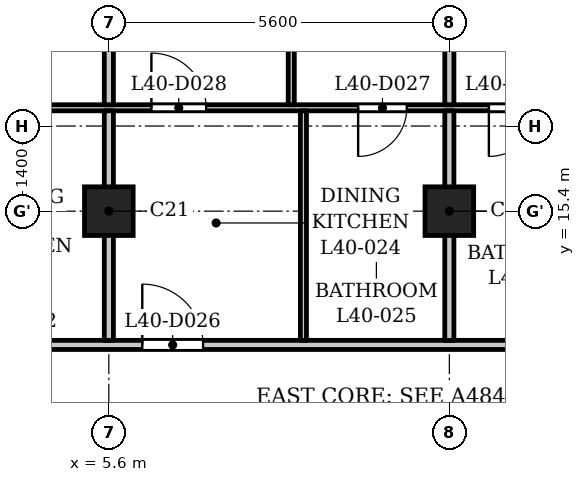
"""IFC4 building model, lengths in metres.
Left out: names, types, materials, properties, quantities, classifications, styles, units other than length and angle.
Written with IfcOpenShell. Run it as: python <this file> out.ifc"""

import sys

from ifc_helpers import new_model, si_unit, direction, frame, frame_2d, origin, origin_2d, place, context, subcontext, project, spatial, rectangle, extrude, element, fill, save


model = new_model("IFC4")
c1 = context("Model", 3, precision=1e-05, world=origin(), true_north=direction((0.0, 1.0)))
c2 = subcontext(c1, "Body", "Model", "MODEL_VIEW")
j1 = project(units=[si_unit("LENGTHUNIT", "METRE"), si_unit("PLANEANGLEUNIT", "RADIAN")], contexts=[c1])
p1 = place(None, origin())
s1 = spatial("IfcSite", under=j1, at=p1, CompositionType="ELEMENT")
p2 = place(p1, origin())
s2 = spatial("IfcBuilding", under=s1, at=p2, CompositionType="ELEMENT")
p3 = place(p2, frame((0.0, 0.0, 157.1)))
s3 = spatial("IfcBuildingStorey", under=s2, at=p3, CompositionType="ELEMENT", Elevation=157.1)
for number, where, z_axis, x_axis in (
    (1, (5.6, 15.4, 0.0), (0.0, 0.0, 1.0), (1.0, 0.0, 0.0)),
    (2, (11.2, 15.4, 0.0), (0.0, 0.0, 1.0), (1.0, 0.0, 0.0)),
):
    element("IfcColumn", number, at=place(p3, frame(where, z_axis=z_axis, x_axis=x_axis)), inside=s3, PredefinedType="COLUMN", context=c2, shape_type="SweptSolid", body=[
        extrude(rectangle(XDim=0.8, YDim=0.8, at=origin_2d()), origin(), (0.0, 0.0, 1.0), 3.5),
    ])
p4 = place(p3, frame((-17.4, 13.2, 0.0), z_axis=(0.0, 0.0, 1.0), x_axis=(1.0, 0.0, 0.0)))
e3 = element("IfcWall", 3, at=p4, inside=s3, PredefinedType="PARTITIONING", context=c2, shape_type="SweptSolid", body=[
    extrude(rectangle(XDim=34.8, YDim=0.15, at=frame_2d((17.4, 0.0))), origin(), (0.0, 0.0, 1.0), 3.2),
])
p5 = place(p4, frame((0.25, 0.0, 0.0)))
e4 = element("IfcOpeningElement", 4, at=p5, cuts=e3, PredefinedType="OPENING", context=c2, shape_type="SweptSolid", body=[
    extrude(rectangle(XDim=1.0, YDim=2.1, at=frame_2d((0.5, 1.05))), frame((0.0, 0.085, 0.0), z_axis=(0.0, -1.0, 0.0), x_axis=(1.0, 0.0, 0.0)), (0.0, 0.0, 1.0), 0.17),
])
p6 = place(p4, frame((33.65, 0.0, 0.0)))
e5 = element("IfcOpeningElement", 5, at=p6, cuts=e3, PredefinedType="OPENING", context=c2, shape_type="SweptSolid", body=[
    extrude(rectangle(XDim=1.0, YDim=2.1, at=frame_2d((0.5, 1.05))), frame((0.0, 0.085, 0.0), z_axis=(0.0, -1.0, 0.0), x_axis=(1.0, 0.0, 0.0)), (0.0, 0.0, 1.0), 0.17),
])
p7 = place(p4, frame((15.75, 0.0, 0.0)))
e6 = element("IfcOpeningElement", 6, at=p7, cuts=e3, PredefinedType="OPENING", context=c2, shape_type="SweptSolid", body=[
    extrude(rectangle(XDim=1.0, YDim=2.1, at=frame_2d((0.5, 1.05))), frame((0.0, 0.085, 0.0), z_axis=(0.0, -1.0, 0.0), x_axis=(1.0, 0.0, 0.0)), (0.0, 0.0, 1.0), 0.17),
])
p8 = place(p4, frame((20.85, 0.0, 0.0)))
e7 = element("IfcOpeningElement", 7, at=p8, cuts=e3, PredefinedType="OPENING", context=c2, shape_type="SweptSolid", body=[
    extrude(rectangle(XDim=1.0, YDim=2.1, at=frame_2d((0.5, 1.05))), frame((0.0, 0.085, 0.0), z_axis=(0.0, -1.0, 0.0), x_axis=(1.0, 0.0, 0.0)), (0.0, 0.0, 1.0), 0.17),
])
p9 = place(p4, frame((23.55, 0.0, 0.0)))
e8 = element("IfcOpeningElement", 8, at=p9, cuts=e3, PredefinedType="OPENING", context=c2, shape_type="SweptSolid", body=[
    extrude(rectangle(XDim=1.0, YDim=2.1, at=frame_2d((0.5, 1.05))), frame((0.0, 0.085, 0.0), z_axis=(0.0, -1.0, 0.0), x_axis=(1.0, 0.0, 0.0)), (0.0, 0.0, 1.0), 0.17),
])
p10 = place(p3, frame((-16.725, 17.1, 0.0), z_axis=(0.0, 0.0, 1.0), x_axis=(1.0, 0.0, 0.0)))
e9 = element("IfcWall", 9, at=p10, inside=s3, PredefinedType="PARTITIONING", context=c2, shape_type="SweptSolid", body=[
    extrude(rectangle(XDim=33.45, YDim=0.1, at=frame_2d((16.725, 0.0))), origin(), (0.0, 0.0, 1.0), 3.2),
])
p11 = place(p10, frame((11.925, 0.0, 0.0)))
e10 = element("IfcOpeningElement", 10, at=p11, cuts=e9, PredefinedType="OPENING", context=c2, shape_type="SweptSolid", body=[
    extrude(rectangle(XDim=0.9, YDim=2.1, at=frame_2d((0.45, 1.05))), frame((0.0, 0.06, 0.0), z_axis=(0.0, -1.0, 0.0), x_axis=(1.0, 0.0, 0.0)), (0.0, 0.0, 1.0), 0.12),
])
p12 = place(p10, frame((15.175, 0.0, 0.0)))
e11 = element("IfcOpeningElement", 11, at=p12, cuts=e9, PredefinedType="OPENING", context=c2, shape_type="SweptSolid", body=[
    extrude(rectangle(XDim=0.9, YDim=2.1, at=frame_2d((0.45, 1.05))), frame((0.0, 0.06, 0.0), z_axis=(0.0, -1.0, 0.0), x_axis=(1.0, 0.0, 0.0)), (0.0, 0.0, 1.0), 0.12),
])
p13 = place(p10, frame((6.575, 0.0, 0.0)))
e12 = element("IfcOpeningElement", 12, at=p13, cuts=e9, PredefinedType="OPENING", context=c2, shape_type="SweptSolid", body=[
    extrude(rectangle(XDim=0.9, YDim=2.1, at=frame_2d((0.45, 1.05))), frame((0.0, 0.06, 0.0), z_axis=(0.0, -1.0, 0.0), x_axis=(1.0, 0.0, 0.0)), (0.0, 0.0, 1.0), 0.12),
])
p14 = place(p10, frame((17.375, 0.0, 0.0)))
e13 = element("IfcOpeningElement", 13, at=p14, cuts=e9, PredefinedType="OPENING", context=c2, shape_type="SweptSolid", body=[
    extrude(rectangle(XDim=0.8, YDim=2.1, at=frame_2d((0.4, 1.05))), frame((0.0, 0.06, 0.0), z_axis=(0.0, -1.0, 0.0), x_axis=(1.0, 0.0, 0.0)), (0.0, 0.0, 1.0), 0.12),
])
p15 = place(p10, frame((20.025, 0.0, 0.0)))
e14 = element("IfcOpeningElement", 14, at=p15, cuts=e9, PredefinedType="OPENING", context=c2, shape_type="SweptSolid", body=[
    extrude(rectangle(XDim=0.9, YDim=2.1, at=frame_2d((0.45, 1.05))), frame((0.0, 0.06, 0.0), z_axis=(0.0, -1.0, 0.0), x_axis=(1.0, 0.0, 0.0)), (0.0, 0.0, 1.0), 0.12),
])
p16 = place(p10, frame((26.425, 0.0, 0.0)))
e15 = element("IfcOpeningElement", 15, at=p16, cuts=e9, PredefinedType="OPENING", context=c2, shape_type="SweptSolid", body=[
    extrude(rectangle(XDim=0.8, YDim=2.1, at=frame_2d((0.4, 1.05))), frame((0.0, 0.06, 0.0), z_axis=(0.0, -1.0, 0.0), x_axis=(1.0, 0.0, 0.0)), (0.0, 0.0, 1.0), 0.12),
])
p17 = place(p10, frame((23.025, 0.0, 0.0)))
e16 = element("IfcOpeningElement", 16, at=p17, cuts=e9, PredefinedType="OPENING", context=c2, shape_type="SweptSolid", body=[
    extrude(rectangle(XDim=0.9, YDim=2.1, at=frame_2d((0.45, 1.05))), frame((0.0, 0.06, 0.0), z_axis=(0.0, -1.0, 0.0), x_axis=(1.0, 0.0, 0.0)), (0.0, 0.0, 1.0), 0.12),
])
p18 = place(p10, frame((28.575, 0.0, 0.0)))
e17 = element("IfcOpeningElement", 17, at=p18, cuts=e9, PredefinedType="OPENING", context=c2, shape_type="SweptSolid", body=[
    extrude(rectangle(XDim=0.8, YDim=2.1, at=frame_2d((0.4, 1.05))), frame((0.0, 0.06, 0.0), z_axis=(0.0, -1.0, 0.0), x_axis=(1.0, 0.0, 0.0)), (0.0, 0.0, 1.0), 0.12),
])
p19 = place(p10, frame((30.725, 0.0, 0.0)))
e18 = element("IfcOpeningElement", 18, at=p19, cuts=e9, PredefinedType="OPENING", context=c2, shape_type="SweptSolid", body=[
    extrude(rectangle(XDim=0.9, YDim=2.1, at=frame_2d((0.45, 1.05))), frame((0.0, 0.06, 0.0), z_axis=(0.0, -1.0, 0.0), x_axis=(1.0, 0.0, 0.0)), (0.0, 0.0, 1.0), 0.12),
])
p20 = place(p3, frame((5.6, 13.275, 0.0), z_axis=(0.0, 0.0, 1.0), x_axis=(0.0, 1.0, 0.0)))
e19 = element("IfcWall", 19, at=p20, inside=s3, PredefinedType="PARTITIONING", context=c2, shape_type="SweptSolid", body=[
    extrude(rectangle(XDim=3.775, YDim=0.15, at=frame_2d((1.888, 0.0))), origin(), (0.0, 0.0, 1.0), 3.2),
])
p21 = place(p3, frame((5.6, 17.15, 0.0), z_axis=(0.0, 0.0, 1.0), x_axis=(0.0, 1.0, 0.0)))
e20 = element("IfcWall", 20, at=p21, inside=s3, PredefinedType="PARTITIONING", context=c2, shape_type="SweptSolid", body=[
    extrude(rectangle(XDim=5.78, YDim=0.15, at=frame_2d((2.89, 0.0))), origin(), (0.0, 0.0, 1.0), 3.2),
])
p22 = place(p3, frame((8.6, 17.15, 0.0), z_axis=(0.0, 0.0, 1.0), x_axis=(0.0, 1.0, 0.0)))
e21 = element("IfcWall", 21, at=p22, inside=s3, PredefinedType="PARTITIONING", context=c2, shape_type="SweptSolid", body=[
    extrude(rectangle(XDim=4.93, YDim=0.1, at=frame_2d((2.465, 0.0))), origin(), (0.0, 0.0, 1.0), 3.2),
])
p23 = place(p22, frame((1.35, 0.0, 0.0)))
e22 = element("IfcOpeningElement", 22, at=p23, cuts=e21, PredefinedType="OPENING", context=c2, shape_type="SweptSolid", body=[
    extrude(rectangle(XDim=0.9, YDim=2.1, at=frame_2d((0.45, 1.05))), frame((0.0, 0.06, 0.0), z_axis=(0.0, -1.0, 0.0), x_axis=(1.0, 0.0, 0.0)), (0.0, 0.0, 1.0), 0.12),
])
p24 = place(p3, frame((8.8, 13.275, 0.0), z_axis=(0.0, 0.0, 1.0), x_axis=(0.0, 1.0, 0.0)))
e23 = element("IfcWall", 23, at=p24, inside=s3, PredefinedType="PARTITIONING", context=c2, shape_type="SweptSolid", body=[
    extrude(rectangle(XDim=3.775, YDim=0.1, at=frame_2d((1.888, 0.0))), origin(), (0.0, 0.0, 1.0), 3.2),
])
p25 = place(p3, frame((11.2, 13.275, 0.0), z_axis=(0.0, 0.0, 1.0), x_axis=(0.0, 1.0, 0.0)))
e24 = element("IfcWall", 24, at=p25, inside=s3, PredefinedType="PARTITIONING", context=c2, shape_type="SweptSolid", body=[
    extrude(rectangle(XDim=3.775, YDim=0.15, at=frame_2d((1.888, 0.0))), origin(), (0.0, 0.0, 1.0), 3.2),
])
p26 = place(p3, frame((11.2, 17.15, 0.0), z_axis=(0.0, 0.0, 1.0), x_axis=(0.0, 1.0, 0.0)))
e25 = element("IfcWall", 25, at=p26, inside=s3, PredefinedType="PARTITIONING", context=c2, shape_type="SweptSolid", body=[
    extrude(rectangle(XDim=5.78, YDim=0.15, at=frame_2d((2.89, 0.0))), origin(), (0.0, 0.0, 1.0), 3.2),
])
p27 = place(p9, origin())
e26 = element("IfcDoor", 26, at=p27, inside=s3, OperationType="SINGLE_SWING_RIGHT", PredefinedType="DOOR", context=c2, shape_type="SweptSolid", body=[
    extrude(rectangle(XDim=1.0, YDim=2.1, at=frame_2d((0.5, 1.05))), frame((0.0, 0.025, 0.0), z_axis=(0.0, -1.0, 0.0), x_axis=(1.0, 0.0, 0.0)), (0.0, 0.0, 1.0), 0.05),
])
fill(e8, e26)
p28 = place(p16, origin())
e27 = element("IfcDoor", 27, at=p28, inside=s3, OperationType="SINGLE_SWING_LEFT", PredefinedType="DOOR", context=c2, shape_type="SweptSolid", body=[
    extrude(rectangle(XDim=0.8, YDim=2.1, at=frame_2d((0.4, 1.05))), frame((0.0, 0.025, 0.0), z_axis=(0.0, -1.0, 0.0), x_axis=(1.0, 0.0, 0.0)), (0.0, 0.0, 1.0), 0.05),
])
fill(e15, e27)
p29 = place(p17, origin())
e28 = element("IfcDoor", 28, at=p29, inside=s3, OperationType="SINGLE_SWING_RIGHT", PredefinedType="DOOR", context=c2, shape_type="SweptSolid", body=[
    extrude(rectangle(XDim=0.9, YDim=2.1, at=frame_2d((0.45, 1.05))), frame((0.0, 0.025, 0.0), z_axis=(0.0, -1.0, 0.0), x_axis=(1.0, 0.0, 0.0)), (0.0, 0.0, 1.0), 0.05),
])
fill(e16, e28)
p30 = place(p18, origin())
e29 = element("IfcDoor", 29, at=p30, inside=s3, OperationType="SINGLE_SWING_LEFT", PredefinedType="DOOR", context=c2, shape_type="SweptSolid", body=[
    extrude(rectangle(XDim=0.8, YDim=2.1, at=frame_2d((0.4, 1.05))), frame((0.0, 0.025, 0.0), z_axis=(0.0, -1.0, 0.0), x_axis=(1.0, 0.0, 0.0)), (0.0, 0.0, 1.0), 0.05),
])
fill(e17, e29)
save(model, sys.argv[1])
